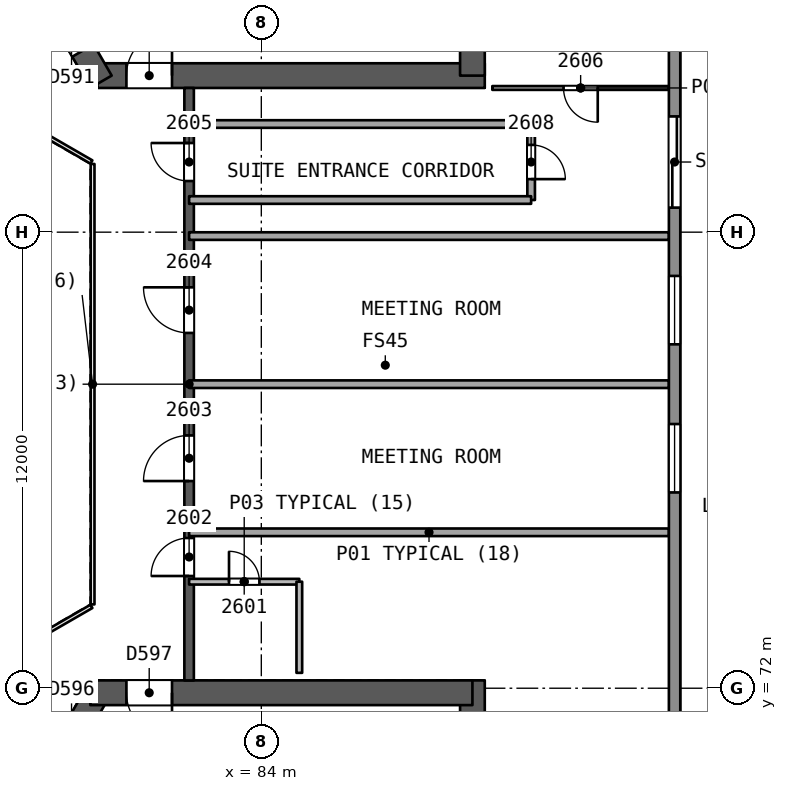
"""IFC4 building model, lengths in metres.
Left out: names, types, materials, properties, quantities, classifications, styles, units other than length and angle.
Written with IfcOpenShell. Run it as: python <this file> out.ifc"""

import sys

from ifc_helpers import new_model, si_unit, direction, frame, frame_2d, origin, place, context, subcontext, project, spatial, rectangle, extrude, element, fill, save


model = new_model("IFC4")
c1 = context("Model", 3, precision=1e-05, world=origin(), true_north=direction((0.0, 1.0)))
c2 = subcontext(c1, "Body", "Model", "MODEL_VIEW")
j1 = project(units=[si_unit("LENGTHUNIT", "METRE"), si_unit("PLANEANGLEUNIT", "RADIAN")], contexts=[c1])
p1 = place(None, origin())
s1 = spatial("IfcSite", under=j1, at=p1, CompositionType="ELEMENT")
p2 = place(p1, origin())
s2 = spatial("IfcBuilding", under=s1, at=p2, CompositionType="ELEMENT")
p3 = place(p2, frame((0.0, 0.0, 110.5)))
s3 = spatial("IfcBuildingStorey", under=s2, at=p3, CompositionType="ELEMENT", Elevation=110.5)
p4 = place(p3, frame((79.688, 88.119, 0.0), z_axis=(0.0, 0.0, 1.0), x_axis=(1.0, 0.0, 0.0)))
e1 = element("IfcWall", 1, at=p4, inside=s3, PredefinedType="SHEAR", context=c2, shape_type="SweptSolid", body=[
    extrude(rectangle(XDim=10.192, YDim=0.65, at=frame_2d((5.096, 0.0))), origin(), (0.0, 0.0, 1.0), 3.7),
])
p5 = place(p4, frame((0.762, 0.0, 0.0)))
e2 = element("IfcOpeningElement", 2, at=p5, cuts=e1, PredefinedType="OPENING", context=c2, shape_type="SweptSolid", body=[
    extrude(rectangle(XDim=1.2, YDim=2.1, at=frame_2d((0.6, 1.05))), frame((0.0, 0.335, 0.0), z_axis=(0.0, -1.0, 0.0), x_axis=(1.0, 0.0, 0.0)), (0.0, 0.0, 1.0), 0.671),
])
p6 = place(p3, frame((89.555, 88.119, 0.0), z_axis=(0.0, 0.0, 1.0), x_axis=(0.0, 1.0, 0.0)))
e3 = element("IfcWall", 3, at=p6, inside=s3, PredefinedType="SHEAR", context=c2, shape_type="SweptSolid", body=[
    extrude(rectangle(XDim=14.009, YDim=0.65, at=frame_2d((7.004, 0.0))), origin(), (0.0, 0.0, 1.0), 3.7),
])
p7 = place(p3, frame((74.754, 96.665, 0.0), z_axis=(0.0, 0.0, 1.0), x_axis=(0.500011799426, -0.866018591275, 0.0)))
e4 = element("IfcWall", 4, at=p7, inside=s3, PredefinedType="SHEAR", context=c2, shape_type="SweptSolid", body=[
    extrude(rectangle(XDim=10.055, YDim=0.65, at=frame_2d((5.027, 0.0))), origin(), (0.0, 0.0, 1.0), 3.7),
])
p8 = place(p7, frame((7.905, 0.0, 0.0)))
e5 = element("IfcOpeningElement", 5, at=p8, cuts=e4, PredefinedType="OPENING", context=c2, shape_type="SweptSolid", body=[
    extrude(rectangle(XDim=1.2, YDim=2.1, at=frame_2d((0.6, 1.05))), frame((0.0, 0.335, 0.0), z_axis=(0.0, -1.0, 0.0), x_axis=(1.0, 0.0, 0.0)), (0.0, 0.0, 1.0), 0.671),
])
p9 = place(p3, frame((79.688, 71.881, 0.0), z_axis=(0.0, 0.0, 1.0), x_axis=(-0.49999822179, -0.866026430432, 0.0)))
e6 = element("IfcWall", 6, at=p9, inside=s3, PredefinedType="SHEAR", context=c2, shape_type="SweptSolid", body=[
    extrude(rectangle(XDim=10.192, YDim=0.65, at=frame_2d((5.096, 0.0))), origin(), (0.0, 0.0, 1.0), 3.7),
])
p10 = place(p9, frame((0.762, 0.0, 0.0)))
e7 = element("IfcOpeningElement", 7, at=p10, cuts=e6, PredefinedType="OPENING", context=c2, shape_type="SweptSolid", body=[
    extrude(rectangle(XDim=1.2, YDim=2.1, at=frame_2d((0.6, 1.05))), frame((0.0, 0.335, 0.0), z_axis=(0.0, -1.0, 0.0), x_axis=(1.0, 0.0, 0.0)), (0.0, 0.0, 1.0), 0.671),
])
p11 = place(p3, frame((89.555, 58.06, 0.0), z_axis=(0.0, 0.0, 1.0), x_axis=(0.0, 1.0, 0.0)))
e8 = element("IfcWall", 8, at=p11, inside=s3, PredefinedType="SHEAR", context=c2, shape_type="SweptSolid", body=[
    extrude(rectangle(XDim=14.146, YDim=0.65, at=frame_2d((7.073, 0.0))), origin(), (0.0, 0.0, 1.0), 3.7),
])
p12 = place(p3, frame((89.555, 71.881, 0.0), z_axis=(0.0, 0.0, 1.0), x_axis=(-1.0, 0.0, 0.0)))
e9 = element("IfcWall", 9, at=p12, inside=s3, PredefinedType="SHEAR", context=c2, shape_type="SweptSolid", body=[
    extrude(rectangle(XDim=10.055, YDim=0.65, at=frame_2d((5.027, 0.0))), origin(), (0.0, 0.0, 1.0), 3.7),
])
p13 = place(p12, frame((7.905, 0.0, 0.0)))
e10 = element("IfcOpeningElement", 10, at=p13, cuts=e9, PredefinedType="OPENING", context=c2, shape_type="SweptSolid", body=[
    extrude(rectangle(XDim=1.2, YDim=2.1, at=frame_2d((0.6, 1.05))), frame((0.0, 0.335, 0.0), z_axis=(0.0, -1.0, 0.0), x_axis=(1.0, 0.0, 0.0)), (0.0, 0.0, 1.0), 0.671),
])
p14 = place(p3, frame((82.1, 72.206, 0.0), z_axis=(0.0, 0.0, 1.0), x_axis=(0.0, 1.0, 0.0)))
e11 = element("IfcWall", 11, at=p14, inside=s3, PredefinedType="SHEAR", context=c2, shape_type="SweptSolid", body=[
    extrude(rectangle(XDim=15.588, YDim=0.25, at=frame_2d((7.794, 0.0))), origin(), (0.0, 0.0, 1.0), 3.25),
])
p15 = place(p14, frame((2.747, 0.0, 0.0)))
e12 = element("IfcOpeningElement", 12, at=p15, cuts=e11, PredefinedType="OPENING", context=c2, shape_type="SweptSolid", body=[
    extrude(rectangle(XDim=1.0, YDim=2.1, at=frame_2d((0.5, 1.05))), frame((0.0, 0.135, 0.0), z_axis=(0.0, -1.0, 0.0), x_axis=(1.0, 0.0, 0.0)), (0.0, 0.0, 1.0), 0.271),
])
p16 = place(p14, frame((5.246, 0.0, 0.0)))
e13 = element("IfcOpeningElement", 13, at=p16, cuts=e11, PredefinedType="OPENING", context=c2, shape_type="SweptSolid", body=[
    extrude(rectangle(XDim=1.2, YDim=2.4, at=frame_2d((0.6, 1.2))), frame((0.0, 0.135, 0.0), z_axis=(0.0, -1.0, 0.0), x_axis=(1.0, 0.0, 0.0)), (0.0, 0.0, 1.0), 0.271),
])
p17 = place(p14, frame((9.143, 0.0, 0.0)))
e14 = element("IfcOpeningElement", 14, at=p17, cuts=e11, PredefinedType="OPENING", context=c2, shape_type="SweptSolid", body=[
    extrude(rectangle(XDim=1.2, YDim=2.4, at=frame_2d((0.6, 1.2))), frame((0.0, 0.135, 0.0), z_axis=(0.0, -1.0, 0.0), x_axis=(1.0, 0.0, 0.0)), (0.0, 0.0, 1.0), 0.271),
])
p18 = place(p14, frame((13.14, 0.0, 0.0)))
e15 = element("IfcOpeningElement", 15, at=p18, cuts=e11, PredefinedType="OPENING", context=c2, shape_type="SweptSolid", body=[
    extrude(rectangle(XDim=1.0, YDim=2.1, at=frame_2d((0.5, 1.05))), frame((0.0, 0.135, 0.0), z_axis=(0.0, -1.0, 0.0), x_axis=(1.0, 0.0, 0.0)), (0.0, 0.0, 1.0), 0.271),
])
p19 = place(p3, frame((82.1, 74.803, 0.0), z_axis=(0.0, 0.0, 1.0), x_axis=(1.0, 0.0, 0.0)))
e16 = element("IfcWall", 16, at=p19, inside=s3, PredefinedType="PARTITIONING", context=c2, shape_type="SweptSolid", body=[
    extrude(rectangle(XDim=2.9, YDim=0.15, at=frame_2d((1.45, 0.0))), origin(), (0.0, 0.0, 1.0), 3.25),
])
p20 = place(p19, frame((1.05, 0.0, 0.0)))
e17 = element("IfcOpeningElement", 17, at=p20, cuts=e16, PredefinedType="OPENING", context=c2, shape_type="SweptSolid", body=[
    extrude(rectangle(XDim=0.8, YDim=2.1, at=frame_2d((0.4, 1.05))), frame((0.0, 0.085, 0.0), z_axis=(0.0, -1.0, 0.0), x_axis=(1.0, 0.0, 0.0)), (0.0, 0.0, 1.0), 0.171),
])
p21 = place(p3, frame((85.0, 74.803, 0.0), z_axis=(0.0, 0.0, 1.0), x_axis=(0.0, -1.0, 0.0)))
e18 = element("IfcWall", 18, at=p21, inside=s3, PredefinedType="PARTITIONING", context=c2, shape_type="SweptSolid", body=[
    extrude(rectangle(XDim=2.398, YDim=0.15, at=frame_2d((1.199, 0.0))), origin(), (0.0, 0.0, 1.0), 3.25),
])
for number, where, z_axis, x_axis in (
    (19, (94.726, 76.103, 0.0), (0.0, 0.0, 1.0), (-1.0, 0.0, 0.0)),
    (20, (94.726, 80.0, 0.0), (0.0, 0.0, 1.0), (-1.0, 0.0, 0.0)),
    (21, (94.726, 83.897, 0.0), (0.0, 0.0, 1.0), (-1.0, 0.0, 0.0)),
):
    element("IfcWall", number, at=place(p3, frame(where, z_axis=z_axis, x_axis=x_axis)), inside=s3, PredefinedType="PARTITIONING", context=c2, shape_type="SweptSolid", body=[
        extrude(rectangle(XDim=12.626, YDim=0.2, at=frame_2d((6.313, 0.0))), origin(), (0.0, 0.0, 1.0), 3.25),
    ])
p22 = place(p3, frame((94.726, 87.794, 0.0), z_axis=(0.0, 0.0, 1.0), x_axis=(-1.0, 0.0, 0.0)))
e22 = element("IfcWall", 22, at=p22, inside=s3, PredefinedType="PARTITIONING", context=c2, shape_type="SweptSolid", body=[
    extrude(rectangle(XDim=4.647, YDim=0.1, at=frame_2d((2.323, 0.0))), origin(), (0.0, 0.0, 1.0), 3.25),
])
p23 = place(p22, frame((1.873, 0.0, 0.0)))
e23 = element("IfcOpeningElement", 23, at=p23, cuts=e22, PredefinedType="OPENING", context=c2, shape_type="SweptSolid", body=[
    extrude(rectangle(XDim=0.9, YDim=2.1, at=frame_2d((0.45, 1.05))), frame((0.0, 0.061, 0.0), z_axis=(0.0, -1.0, 0.0), x_axis=(1.0, 0.0, 0.0)), (0.0, 0.0, 1.0), 0.121),
])
p24 = place(p3, frame((82.1, 86.846, 0.0), z_axis=(0.0, 0.0, 1.0), x_axis=(1.0, 0.0, 0.0)))
e24 = element("IfcWall", 24, at=p24, inside=s3, PredefinedType="PARTITIONING", context=c2, shape_type="SweptSolid", body=[
    extrude(rectangle(XDim=9.0, YDim=0.2, at=frame_2d((4.5, 0.0))), origin(), (0.0, 0.0, 1.0), 3.25),
])
p25 = place(p3, frame((91.1, 86.846, 0.0), z_axis=(0.0, 0.0, 1.0), x_axis=(0.0, -1.0, 0.0)))
e25 = element("IfcWall", 25, at=p25, inside=s3, PredefinedType="PARTITIONING", context=c2, shape_type="SweptSolid", body=[
    extrude(rectangle(XDim=2.0, YDim=0.2, at=frame_2d((1.0, 0.0))), origin(), (0.0, 0.0, 1.0), 3.25),
])
p26 = place(p25, frame((0.55, 0.0, 0.0)))
e26 = element("IfcOpeningElement", 26, at=p26, cuts=e25, PredefinedType="OPENING", context=c2, shape_type="SweptSolid", body=[
    extrude(rectangle(XDim=0.9, YDim=2.1, at=frame_2d((0.45, 1.05))), frame((0.0, 0.11, 0.0), z_axis=(0.0, -1.0, 0.0), x_axis=(1.0, 0.0, 0.0)), (0.0, 0.0, 1.0), 0.221),
])
p27 = place(p3, frame((91.1, 84.846, 0.0), z_axis=(0.0, 0.0, 1.0), x_axis=(-1.0, 0.0, 0.0)))
e27 = element("IfcWall", 27, at=p27, inside=s3, PredefinedType="PARTITIONING", context=c2, shape_type="SweptSolid", body=[
    extrude(rectangle(XDim=9.0, YDim=0.2, at=frame_2d((4.5, 0.0))), origin(), (0.0, 0.0, 1.0), 3.25),
])
p28 = place(p3, frame((94.875, 108.576, 0.0), z_axis=(0.0, 0.0, 1.0), x_axis=(0.0, -1.0, 0.0)))
e28 = element("IfcWall", 28, at=p28, inside=s3, PredefinedType="SOLIDWALL", context=c2, shape_type="SweptSolid", body=[
    extrude(rectangle(XDim=57.152, YDim=0.3, at=frame_2d((28.576, 0.0))), origin(), (0.0, 0.0, 1.0), 3.25),
])
p29 = place(p28, frame((21.531, 0.0, 0.0)))
e29 = element("IfcOpeningElement", 29, at=p29, cuts=e28, PredefinedType="OPENING", context=c2, shape_type="SweptSolid", body=[
    extrude(rectangle(XDim=2.4, YDim=2.4, at=frame_2d((1.2, 1.2))), frame((0.0, 0.161, 0.0), z_axis=(0.0, -1.0, 0.0), x_axis=(1.0, 0.0, 0.0)), (0.0, 0.0, 1.0), 0.321),
])
p30 = place(p28, frame((10.373, 0.0, 0.0)))
e30 = element("IfcOpeningElement", 30, at=p30, cuts=e28, PredefinedType="OPENING", context=c2, shape_type="SweptSolid", body=[
    extrude(rectangle(XDim=2.4, YDim=2.4, at=frame_2d((1.2, 1.2))), frame((0.0, 0.161, 0.0), z_axis=(0.0, -1.0, 0.0), x_axis=(1.0, 0.0, 0.0)), (0.0, 0.0, 1.0), 0.321),
])
p31 = place(p28, frame((43.656, 0.0, 0.0)))
e31 = element("IfcOpeningElement", 31, at=p31, cuts=e28, PredefinedType="OPENING", context=c2, shape_type="SweptSolid", body=[
    extrude(rectangle(XDim=2.4, YDim=2.4, at=frame_2d((1.2, 1.2))), frame((0.0, 0.161, 0.0), z_axis=(0.0, -1.0, 0.0), x_axis=(1.0, 0.0, 0.0)), (0.0, 0.0, 1.0), 0.321),
])
p32 = place(p28, frame((29.625, 0.0, 0.9)))
e32 = element("IfcOpeningElement", 32, at=p32, cuts=e28, PredefinedType="OPENING", context=c2, shape_type="SweptSolid", body=[
    extrude(rectangle(XDim=1.8, YDim=1.5, at=frame_2d((0.9, 0.75))), frame((0.0, 0.161, 0.0), z_axis=(0.0, -1.0, 0.0), x_axis=(1.0, 0.0, 0.0)), (0.0, 0.0, 1.0), 0.321),
])
p33 = place(p28, frame((25.728, 0.0, 0.9)))
e33 = element("IfcOpeningElement", 33, at=p33, cuts=e28, PredefinedType="OPENING", context=c2, shape_type="SweptSolid", body=[
    extrude(rectangle(XDim=1.8, YDim=1.5, at=frame_2d((0.9, 0.75))), frame((0.0, 0.161, 0.0), z_axis=(0.0, -1.0, 0.0), x_axis=(1.0, 0.0, 0.0)), (0.0, 0.0, 1.0), 0.321),
])
p34 = place(p3, frame((40.315, 82.924, 0.0), z_axis=(0.0, 0.0, 1.0), x_axis=(0.866025315226, 0.500000153387, 0.0)))
e34 = element("IfcWall", 34, at=p34, inside=s3, PredefinedType="SOLIDWALL", context=c2, shape_type="SweptSolid", body=[
    extrude(rectangle(XDim=57.152, YDim=0.3, at=frame_2d((28.576, 0.0))), origin(), (0.0, 0.0, 1.0), 3.25),
])
p35 = place(p34, frame((23.479, 0.0, 0.0)))
e35 = element("IfcOpeningElement", 35, at=p35, cuts=e34, PredefinedType="OPENING", context=c2, shape_type="SweptSolid", body=[
    extrude(rectangle(XDim=2.4, YDim=2.4, at=frame_2d((1.2, 1.2))), frame((0.0, 0.161, 0.0), z_axis=(0.0, -1.0, 0.0), x_axis=(1.0, 0.0, 0.0)), (0.0, 0.0, 1.0), 0.321),
])
p36 = place(p34, frame((10.373, 0.0, 0.0)))
e36 = element("IfcOpeningElement", 36, at=p36, cuts=e34, PredefinedType="OPENING", context=c2, shape_type="SweptSolid", body=[
    extrude(rectangle(XDim=2.4, YDim=2.4, at=frame_2d((1.2, 1.2))), frame((0.0, 0.161, 0.0), z_axis=(0.0, -1.0, 0.0), x_axis=(1.0, 0.0, 0.0)), (0.0, 0.0, 1.0), 0.321),
])
p37 = place(p34, frame((41.708, 0.0, 0.0)))
e37 = element("IfcOpeningElement", 37, at=p37, cuts=e34, PredefinedType="OPENING", context=c2, shape_type="SweptSolid", body=[
    extrude(rectangle(XDim=2.4, YDim=2.4, at=frame_2d((1.2, 1.2))), frame((0.0, 0.161, 0.0), z_axis=(0.0, -1.0, 0.0), x_axis=(1.0, 0.0, 0.0)), (0.0, 0.0, 1.0), 0.321),
])
p38 = place(p3, frame((89.81, 48.5, 0.0), z_axis=(0.0, 0.0, 1.0), x_axis=(-0.866025315226, 0.500000153387, 0.0)))
e38 = element("IfcWall", 38, at=p38, inside=s3, PredefinedType="SOLIDWALL", context=c2, shape_type="SweptSolid", body=[
    extrude(rectangle(XDim=57.152, YDim=0.3, at=frame_2d((28.576, 0.0))), origin(), (0.0, 0.0, 1.0), 3.25),
])
p39 = place(p38, frame((22.232, 0.0, 0.0)))
e39 = element("IfcOpeningElement", 39, at=p39, cuts=e38, PredefinedType="OPENING", context=c2, shape_type="SweptSolid", body=[
    extrude(rectangle(XDim=2.4, YDim=2.4, at=frame_2d((1.2, 1.2))), frame((0.0, 0.161, 0.0), z_axis=(0.0, -1.0, 0.0), x_axis=(1.0, 0.0, 0.0)), (0.0, 0.0, 1.0), 0.321),
])
p40 = place(p38, frame((10.373, 0.0, 0.0)))
e40 = element("IfcOpeningElement", 40, at=p40, cuts=e38, PredefinedType="OPENING", context=c2, shape_type="SweptSolid", body=[
    extrude(rectangle(XDim=2.4, YDim=2.4, at=frame_2d((1.2, 1.2))), frame((0.0, 0.161, 0.0), z_axis=(0.0, -1.0, 0.0), x_axis=(1.0, 0.0, 0.0)), (0.0, 0.0, 1.0), 0.321),
])
p41 = place(p38, frame((42.955, 0.0, 0.0)))
e41 = element("IfcOpeningElement", 41, at=p41, cuts=e38, PredefinedType="OPENING", context=c2, shape_type="SweptSolid", body=[
    extrude(rectangle(XDim=2.4, YDim=2.4, at=frame_2d((1.2, 1.2))), frame((0.0, 0.161, 0.0), z_axis=(0.0, -1.0, 0.0), x_axis=(1.0, 0.0, 0.0)), (0.0, 0.0, 1.0), 0.321),
])
p42 = place(p38, frame((27.676, 0.0, 0.9)))
e42 = element("IfcOpeningElement", 42, at=p42, cuts=e38, PredefinedType="OPENING", context=c2, shape_type="SweptSolid", body=[
    extrude(rectangle(XDim=1.8, YDim=1.5, at=frame_2d((0.9, 0.75))), frame((0.0, 0.161, 0.0), z_axis=(0.0, -1.0, 0.0), x_axis=(1.0, 0.0, 0.0)), (0.0, 0.0, 1.0), 0.321),
])
p43 = place(p3, frame((79.56, 74.206, 0.0), z_axis=(0.0, 0.0, 1.0), x_axis=(0.0, 1.0, 0.0)))
e43 = element("IfcWall", 43, at=p43, inside=s3, PredefinedType="PARTITIONING", context=c2, shape_type="SweptSolid", body=[
    extrude(rectangle(XDim=11.588, YDim=0.1, at=frame_2d((5.794, 0.0))), origin(), (0.0, 0.0, 1.0), 3.25),
])
for number, where, z_axis, x_axis in (
    (44, (79.53, 85.846, 0.0), (0.0, 0.0, 1.0), (-0.866, 0.5, 0.0)),
    (45, (77.798, 73.154, 0.0), (0.0, 0.0, 1.0), (0.866, 0.5, 0.0)),
):
    element("IfcWall", number, at=place(p3, frame(where, z_axis=z_axis, x_axis=x_axis)), inside=s3, PredefinedType="PARTITIONING", context=c2, shape_type="SweptSolid", body=[
        extrude(rectangle(XDim=2.0, YDim=0.1, at=frame_2d((1.0, 0.0))), origin(), (0.0, 0.0, 1.0), 3.25),
    ])
p44 = place(p20, origin())
e46 = element("IfcDoor", 46, at=p44, inside=s3, OperationType="SINGLE_SWING_LEFT", PredefinedType="NOTDEFINED", context=c2, shape_type="SweptSolid", body=[
    extrude(rectangle(XDim=0.8, YDim=2.1, at=frame_2d((0.4, 1.05))), frame((0.0, 0.025, 0.0), z_axis=(0.0, -1.0, 0.0), x_axis=(1.0, 0.0, 0.0)), (0.0, 0.0, 1.0), 0.05),
])
fill(e17, e46)
p45 = place(p15, origin())
e47 = element("IfcDoor", 47, at=p45, inside=s3, OperationType="SINGLE_SWING_LEFT", PredefinedType="NOTDEFINED", context=c2, shape_type="SweptSolid", body=[
    extrude(rectangle(XDim=1.0, YDim=2.1, at=frame_2d((0.5, 1.05))), frame((0.0, 0.025, 0.0), z_axis=(0.0, -1.0, 0.0), x_axis=(1.0, 0.0, 0.0)), (0.0, 0.0, 1.0), 0.05),
])
fill(e12, e47)
p46 = place(p16, origin())
e48 = element("IfcDoor", 48, at=p46, inside=s3, OperationType="SINGLE_SWING_LEFT", PredefinedType="NOTDEFINED", context=c2, shape_type="SweptSolid", body=[
    extrude(rectangle(XDim=1.2, YDim=2.4, at=frame_2d((0.6, 1.2))), frame((0.0, 0.025, 0.0), z_axis=(0.0, -1.0, 0.0), x_axis=(1.0, 0.0, 0.0)), (0.0, 0.0, 1.0), 0.05),
])
fill(e13, e48)
p47 = place(p17, origin())
e49 = element("IfcDoor", 49, at=p47, inside=s3, OperationType="SINGLE_SWING_RIGHT", PredefinedType="NOTDEFINED", context=c2, shape_type="SweptSolid", body=[
    extrude(rectangle(XDim=1.2, YDim=2.4, at=frame_2d((0.6, 1.2))), frame((0.0, 0.025, 0.0), z_axis=(0.0, -1.0, 0.0), x_axis=(1.0, 0.0, 0.0)), (0.0, 0.0, 1.0), 0.05),
])
fill(e14, e49)
p48 = place(p18, origin())
e50 = element("IfcDoor", 50, at=p48, inside=s3, OperationType="SINGLE_SWING_RIGHT", PredefinedType="NOTDEFINED", context=c2, shape_type="SweptSolid", body=[
    extrude(rectangle(XDim=1.0, YDim=2.1, at=frame_2d((0.5, 1.05))), frame((0.0, 0.025, 0.0), z_axis=(0.0, -1.0, 0.0), x_axis=(1.0, 0.0, 0.0)), (0.0, 0.0, 1.0), 0.05),
])
fill(e15, e50)
p49 = place(p23, origin())
e51 = element("IfcDoor", 51, at=p49, inside=s3, OperationType="SINGLE_SWING_LEFT", PredefinedType="NOTDEFINED", context=c2, shape_type="SweptSolid", body=[
    extrude(rectangle(XDim=0.9, YDim=2.1, at=frame_2d((0.45, 1.05))), frame((0.0, 0.025, 0.0), z_axis=(0.0, -1.0, 0.0), x_axis=(1.0, 0.0, 0.0)), (0.0, 0.0, 1.0), 0.05),
])
fill(e23, e51)
p50 = place(p26, origin())
e52 = element("IfcDoor", 52, at=p50, inside=s3, OperationType="SINGLE_SWING_RIGHT", PredefinedType="NOTDEFINED", context=c2, shape_type="SweptSolid", body=[
    extrude(rectangle(XDim=0.9, YDim=2.1, at=frame_2d((0.45, 1.05))), frame((0.0, 0.025, 0.0), z_axis=(0.0, -1.0, 0.0), x_axis=(1.0, 0.0, 0.0)), (0.0, 0.0, 1.0), 0.05),
])
fill(e26, e52)
p51 = place(p29, origin())
e53 = element("IfcDoor", 53, at=p51, inside=s3, OperationType="SLIDING_TO_LEFT", PredefinedType="NOTDEFINED", context=c2, shape_type="SweptSolid", body=[
    extrude(rectangle(XDim=2.4, YDim=2.4, at=frame_2d((1.2, 1.2))), frame((0.0, 0.025, 0.0), z_axis=(0.0, -1.0, 0.0), x_axis=(1.0, 0.0, 0.0)), (0.0, 0.0, 1.0), 0.05),
])
fill(e29, e53)
p52 = place(p32, origin())
e54 = element("IfcWindow", 54, at=p52, inside=s3, PartitioningType="SINGLE_PANEL", PredefinedType="WINDOW", context=c2, shape_type="SweptSolid", body=[
    extrude(rectangle(XDim=1.8, YDim=1.5, at=frame_2d((0.9, 0.75))), frame((0.0, 0.03, 0.0), z_axis=(0.0, -1.0, 0.0), x_axis=(1.0, 0.0, 0.0)), (0.0, 0.0, 1.0), 0.06),
])
fill(e32, e54)
p53 = place(p33, origin())
e55 = element("IfcWindow", 55, at=p53, inside=s3, PartitioningType="SINGLE_PANEL", PredefinedType="WINDOW", context=c2, shape_type="SweptSolid", body=[
    extrude(rectangle(XDim=1.8, YDim=1.5, at=frame_2d((0.9, 0.75))), frame((0.0, 0.03, 0.0), z_axis=(0.0, -1.0, 0.0), x_axis=(1.0, 0.0, 0.0)), (0.0, 0.0, 1.0), 0.06),
])
fill(e33, e55)
p54 = place(p5, origin())
e56 = element("IfcDoor", 56, at=p54, inside=s3, OperationType="SINGLE_SWING_RIGHT", PredefinedType="NOTDEFINED", context=c2, shape_type="SweptSolid", body=[
    extrude(rectangle(XDim=1.2, YDim=2.1, at=frame_2d((0.6, 1.05))), frame((0.0, 0.025, 0.0), z_axis=(0.0, -1.0, 0.0), x_axis=(1.0, 0.0, 0.0)), (0.0, 0.0, 1.0), 0.05),
])
fill(e2, e56)
p55 = place(p13, origin())
e57 = element("IfcDoor", 57, at=p55, inside=s3, OperationType="SINGLE_SWING_LEFT", PredefinedType="NOTDEFINED", context=c2, shape_type="SweptSolid", body=[
    extrude(rectangle(XDim=1.2, YDim=2.1, at=frame_2d((0.6, 1.05))), frame((0.0, 0.025, 0.0), z_axis=(0.0, -1.0, 0.0), x_axis=(1.0, 0.0, 0.0)), (0.0, 0.0, 1.0), 0.05),
])
fill(e10, e57)
save(model, sys.argv[1])
